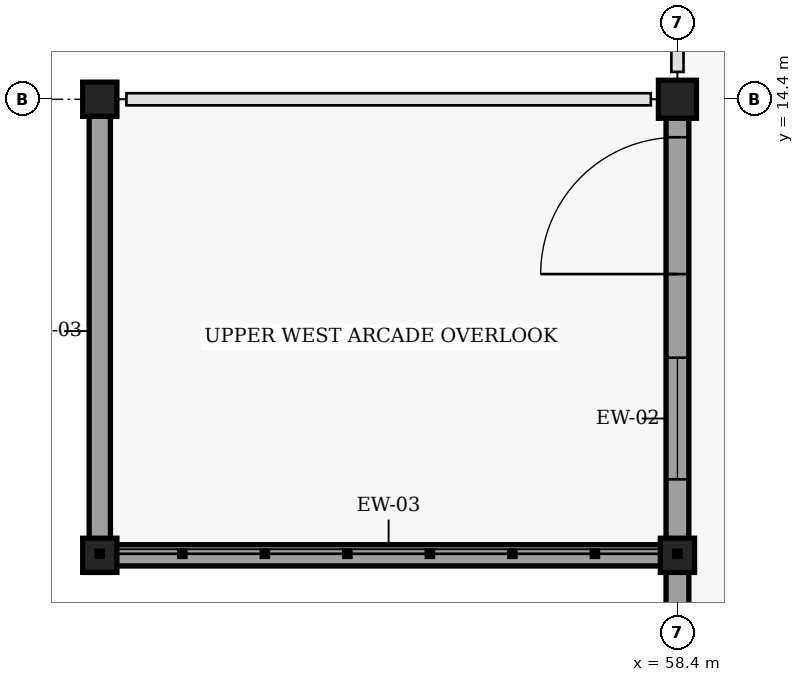
"""IFC4 building model, lengths in metres.
Left out: names, types, materials, properties, quantities, classifications, styles, units other than length and angle.
Written with IfcOpenShell. Run it as: python <this file> out.ifc"""

import sys

from ifc_helpers import new_model, si_unit, direction, frame, frame_2d, origin, origin_2d, place, context, subcontext, project, spatial, rectangle, extrude, element, fill, save


model = new_model("IFC4")
c1 = context("Model", 3, precision=1e-05, world=origin(), true_north=direction((0.0, 1.0)))
c2 = subcontext(c1, "Body", "Model", "MODEL_VIEW")
j1 = project(units=[si_unit("LENGTHUNIT", "METRE"), si_unit("PLANEANGLEUNIT", "RADIAN")], contexts=[c1])
p1 = place(None, origin())
s1 = spatial("IfcSite", under=j1, at=p1, CompositionType="ELEMENT")
p2 = place(p1, origin())
s2 = spatial("IfcBuilding", under=s1, at=p2, CompositionType="ELEMENT")
p3 = place(p2, frame((0.0, 0.0, 4.8)))
s3 = spatial("IfcBuildingStorey", under=s2, at=p3, CompositionType="ELEMENT", Elevation=4.8)
p4 = place(p3, frame((58.4, 14.4, 0.0), z_axis=(0.0, 0.0, 1.0), x_axis=(1.0, 0.0, 0.0)))
e1 = element("IfcColumn", 1, at=p4, inside=s3, PredefinedType="COLUMN", context=c2, shape_type="SweptSolid", body=[
    extrude(rectangle(XDim=0.5, YDim=0.5, at=origin_2d()), origin(), (0.0, 0.0, 1.0), 4.2),
])
for number, where, z_axis, x_axis in (
    (2, (50.8, 8.4, 0.0), (0.0, 0.0, 1.0), (1.0, 0.0, 0.0)),
    (3, (50.8, 14.4, 0.0), (0.0, 0.0, 1.0), (1.0, 0.0, 0.0)),
    (4, (58.4, 8.4, 0.0), (0.0, 0.0, 1.0), (1.0, 0.0, 0.0)),
):
    element("IfcColumn", number, at=place(p3, frame(where, z_axis=z_axis, x_axis=x_axis)), inside=s3, PredefinedType="COLUMN", context=c2, shape_type="SweptSolid", body=[
        extrude(rectangle(XDim=0.45, YDim=0.45, at=origin_2d()), origin(), (0.0, 0.0, 1.0), 4.2),
    ])
p5 = place(p3, frame((58.4, 6.1, 0.0), z_axis=(0.0, 0.0, 1.0), x_axis=(0.0, 1.0, 0.0)))
e5 = element("IfcWall", 5, at=p5, inside=s3, PredefinedType="SOLIDWALL", context=c2, shape_type="SweptSolid", body=[
    extrude(rectangle(XDim=8.2, YDim=0.3, at=frame_2d((4.1, 0.0))), origin(), (0.0, 0.0, 1.0), 3.495),
])
p6 = place(p5, frame((3.3, 0.0, 0.9)))
e6 = element("IfcOpeningElement", 6, at=p6, cuts=e5, PredefinedType="OPENING", context=c2, shape_type="SweptSolid", body=[
    extrude(rectangle(XDim=1.6, YDim=2.1, at=frame_2d((0.8, 1.05))), frame((0.0, 0.16, 0.0), z_axis=(0.0, -1.0, 0.0), x_axis=(1.0, 0.0, 0.0)), (0.0, 0.0, 1.0), 0.32),
])
p7 = place(p5, frame((6.0, 0.0, 0.0)))
e7 = element("IfcOpeningElement", 7, at=p7, cuts=e5, PredefinedType="OPENING", context=c2, shape_type="SweptSolid", body=[
    extrude(rectangle(XDim=1.8, YDim=2.25, at=frame_2d((0.9, 1.125))), frame((0.0, 0.16, 0.0), z_axis=(0.0, -1.0, 0.0), x_axis=(1.0, 0.0, 0.0)), (0.0, 0.0, 1.0), 0.32),
])
p8 = place(p3, frame((50.95, 8.4, 0.0), z_axis=(0.0, 0.0, 1.0), x_axis=(1.0, 0.0, 0.0)))
e8 = element("IfcWall", 8, at=p8, inside=s3, PredefinedType="SOLIDWALL", context=c2, shape_type="SweptSolid", body=[
    extrude(rectangle(XDim=7.3, YDim=0.28, at=frame_2d((3.65, 0.0))), origin(), (0.0, 0.0, 1.0), 4.1),
])
p9 = place(p3, frame((50.8, 8.45, 0.0), z_axis=(0.0, 0.0, 1.0), x_axis=(0.0, 1.0, 0.0)))
e9 = element("IfcWall", 9, at=p9, inside=s3, PredefinedType="SOLIDWALL", context=c2, shape_type="SweptSolid", body=[
    extrude(rectangle(XDim=5.8, YDim=0.28, at=frame_2d((2.9, 0.0))), origin(), (0.0, 0.0, 1.0), 3.872),
])
p10 = place(p6, origin())
e10 = element("IfcWindow", 10, at=p10, inside=s3, PartitioningType="SINGLE_PANEL", PredefinedType="WINDOW", context=c2, shape_type="SweptSolid", body=[
    extrude(rectangle(XDim=1.6, YDim=2.1, at=frame_2d((0.8, 1.05))), frame((0.0, 0.03, 0.0), z_axis=(0.0, -1.0, 0.0), x_axis=(1.0, 0.0, 0.0)), (0.0, 0.0, 1.0), 0.06),
])
fill(e6, e10)
p11 = place(p7, origin())
e11 = element("IfcDoor", 11, at=p11, inside=s3, OperationType="DOUBLE_DOOR_SINGLE_SWING", PredefinedType="DOOR", context=c2, shape_type="SweptSolid", body=[
    extrude(rectangle(XDim=1.8, YDim=2.25, at=frame_2d((0.9, 1.125))), frame((0.0, 0.025, 0.0), z_axis=(0.0, -1.0, 0.0), x_axis=(1.0, 0.0, 0.0)), (0.0, 0.0, 1.0), 0.05),
])
fill(e7, e11)
save(model, sys.argv[1])
